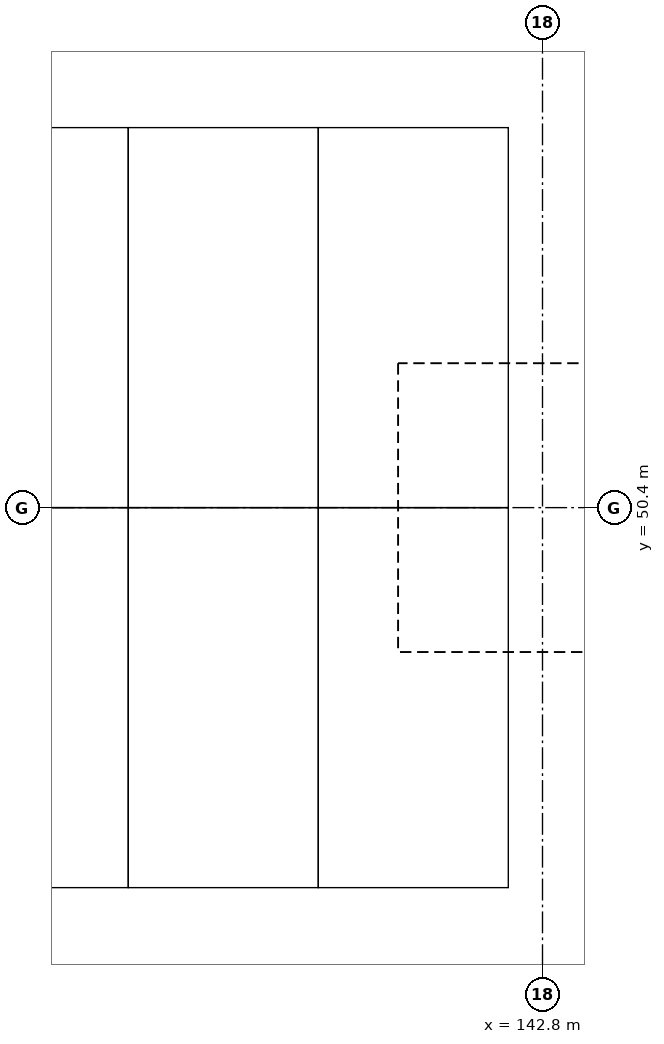
"""IFC4 building model, lengths in metres.
Left out: names, types, materials, properties, quantities, classifications, styles, units other than length and angle.
Written with IfcOpenShell. Run it as: python <this file> out.ifc"""

import sys

from ifc_helpers import new_model, si_unit, direction, frame, origin, origin_2d, place, context, subcontext, project, spatial, rectangle, extrude, element, save


model = new_model("IFC4")
c1 = context("Model", 3, precision=1e-05, world=origin(), true_north=direction((0.0, 1.0)))
c2 = subcontext(c1, "Body", "Model", "MODEL_VIEW")
j1 = project(units=[si_unit("LENGTHUNIT", "METRE"), si_unit("PLANEANGLEUNIT", "RADIAN")], contexts=[c1])
p1 = place(None, origin())
s1 = spatial("IfcSite", under=j1, at=p1, CompositionType="ELEMENT")
p2 = place(p1, origin())
s2 = spatial("IfcBuilding", under=s1, at=p2, CompositionType="ELEMENT")
p3 = place(p2, frame((0.0, 0.0, -3.0)))
s3 = spatial("IfcBuildingStorey", under=s2, at=p3, CompositionType="ELEMENT", Elevation=-3.0)
p4 = place(p3, frame((142.8, 50.4, 0.0), z_axis=(0.0, 0.0, 1.0), x_axis=(1.0, 0.0, 0.0)))
e1 = element("IfcColumn", 1, at=p4, inside=s3, PredefinedType="COLUMN", context=c2, shape_type="SweptSolid", body=[
    extrude(rectangle(XDim=0.8, YDim=0.8, at=origin_2d()), origin(), (0.0, 0.0, 1.0), 3.0),
])
save(model, sys.argv[1])
